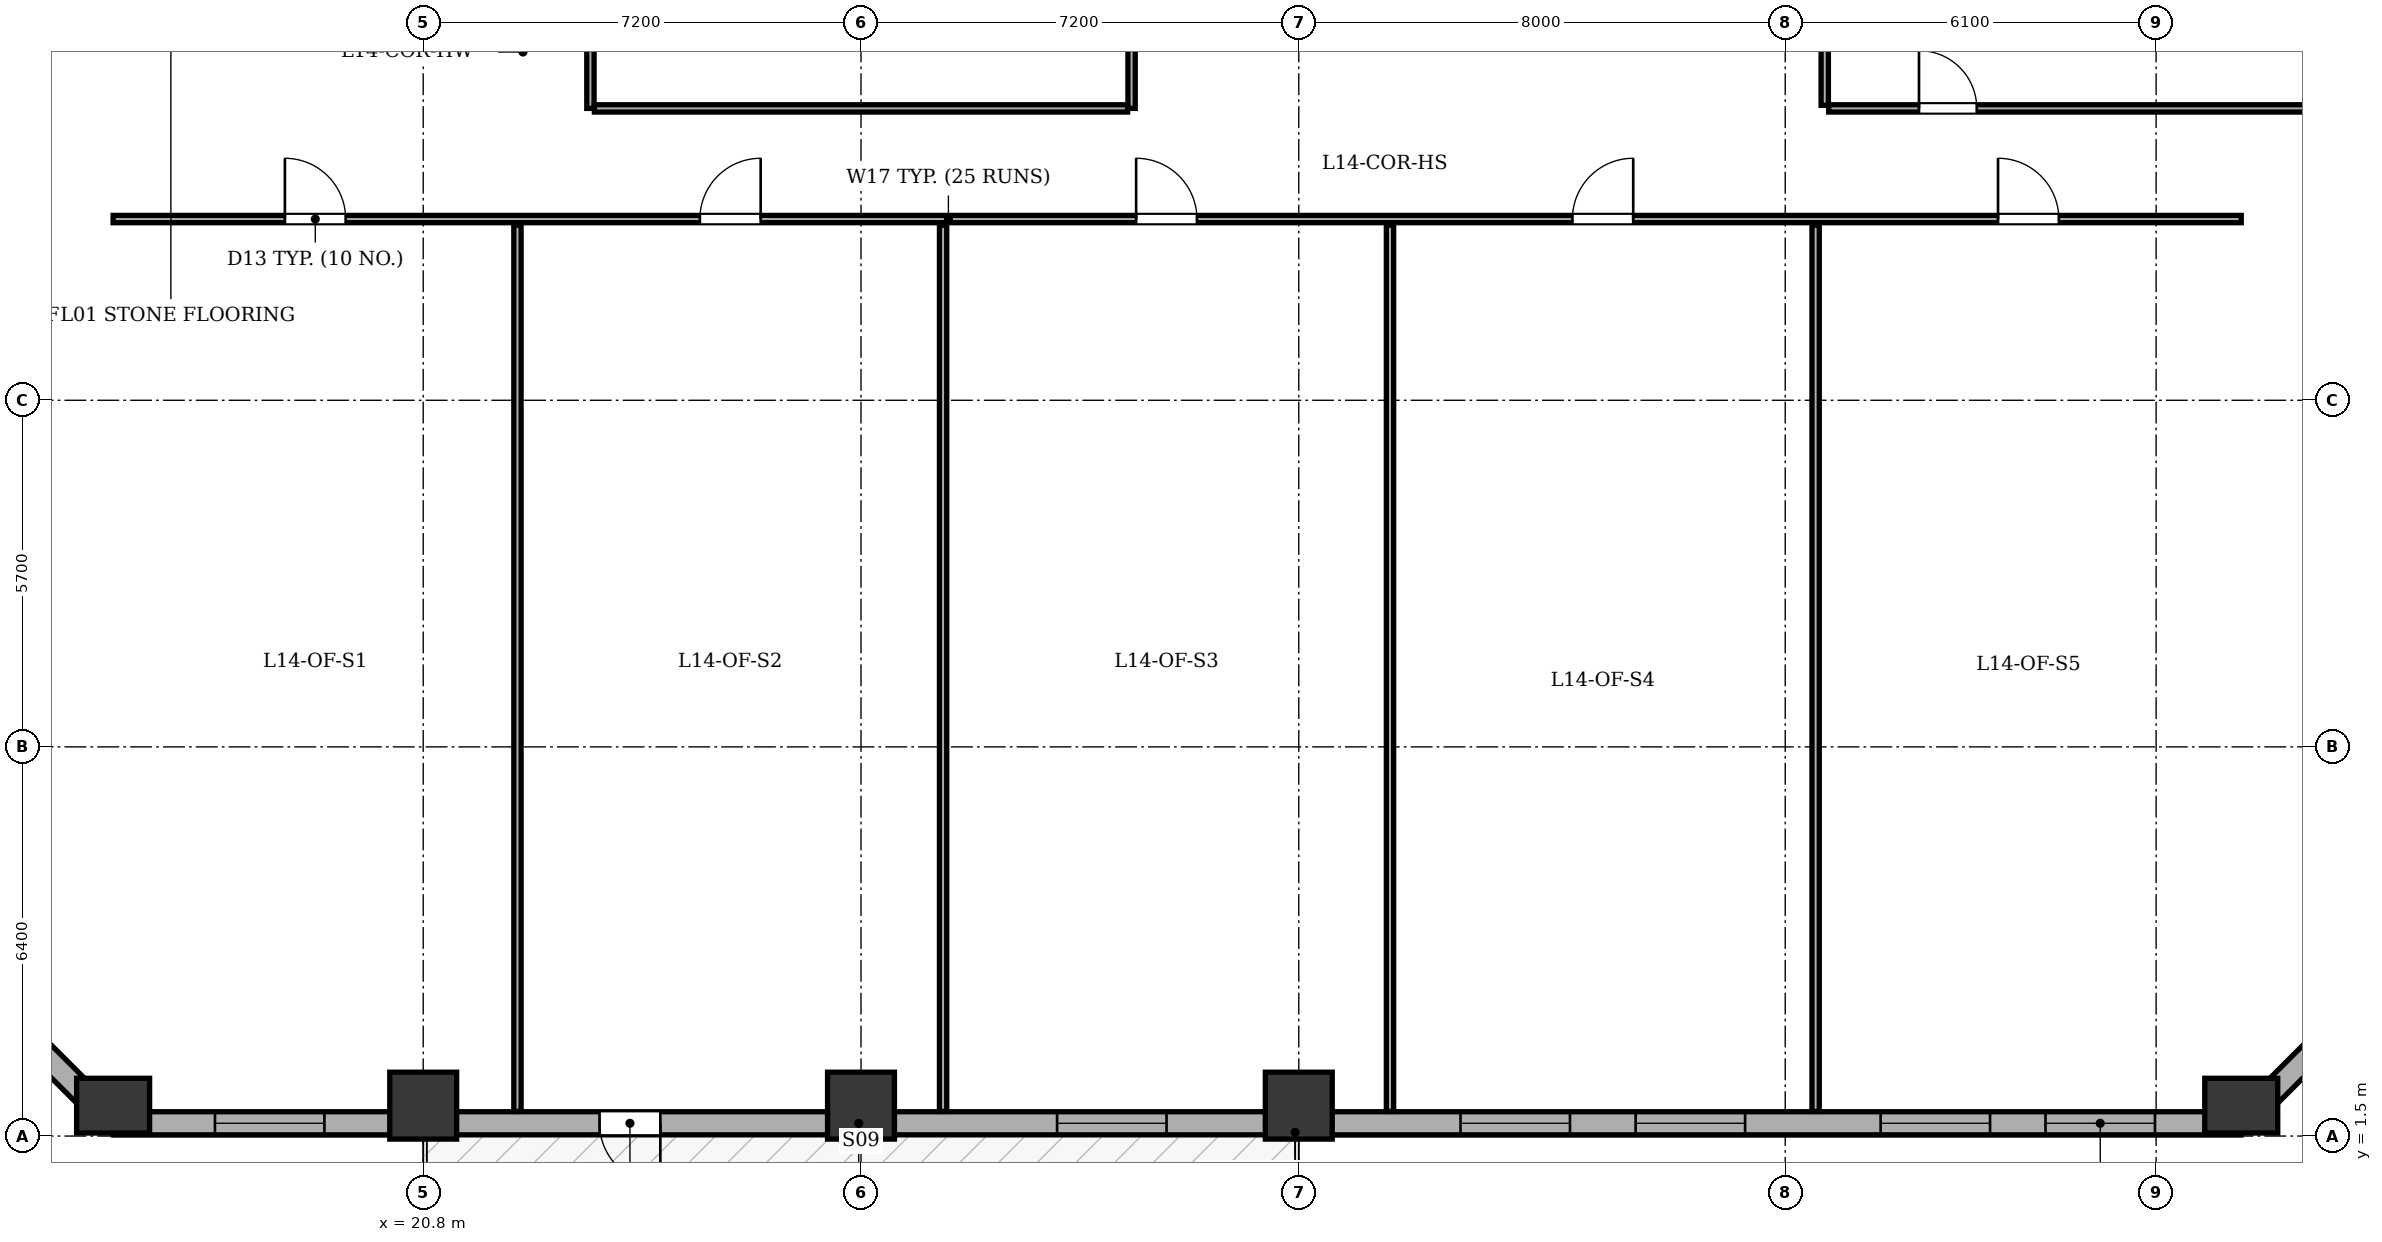
"""IFC4 building model, lengths in metres.
Left out: names, types, materials, properties, quantities, classifications, styles, units other than length and angle.
Written with IfcOpenShell. Run it as: python <this file> out.ifc"""

import sys

from ifc_helpers import new_model, si_unit, direction, frame, frame_2d, origin, origin_2d, place, context, subcontext, project, spatial, rectangle, extrude, element, fill, save


model = new_model("IFC4")
c1 = context("Model", 3, precision=1e-05, world=origin(), true_north=direction((0.0, 1.0)))
c2 = subcontext(c1, "Body", "Model", "MODEL_VIEW")
j1 = project(units=[si_unit("LENGTHUNIT", "METRE"), si_unit("PLANEANGLEUNIT", "RADIAN")], contexts=[c1])
p1 = place(None, origin())
s1 = spatial("IfcSite", under=j1, at=p1, CompositionType="ELEMENT")
p2 = place(p1, origin())
s2 = spatial("IfcBuilding", under=s1, at=p2, CompositionType="ELEMENT")
p3 = place(p2, frame((0.0, 0.0, 59.4)))
s3 = spatial("IfcBuildingStorey", under=s2, at=p3, CompositionType="ELEMENT", Elevation=59.4)
p4 = place(p3, frame((15.7, 2.0, 0.0), z_axis=(0.0, 0.0, 1.0), x_axis=(1.0, 0.0, 0.0)))
e1 = element("IfcColumn", 1, at=p4, inside=s3, PredefinedType="COLUMN", context=c2, shape_type="SweptSolid", body=[
    extrude(rectangle(XDim=0.9, YDim=1.2, at=origin_2d()), origin(), (0.0, 0.0, 1.0), 3.9),
])
for number, where, z_axis, x_axis in (
    (2, (20.8, 2.0, 0.0), (0.0, 0.0, 1.0), (1.0, 0.0, 0.0)),
    (3, (28.0, 2.0, 0.0), (0.0, 0.0, 1.0), (1.0, 0.0, 0.0)),
    (4, (35.2, 2.0, 0.0), (0.0, 0.0, 1.0), (1.0, 0.0, 0.0)),
):
    element("IfcColumn", number, at=place(p3, frame(where, z_axis=z_axis, x_axis=x_axis)), inside=s3, PredefinedType="COLUMN", context=c2, shape_type="SweptSolid", body=[
        extrude(rectangle(XDim=1.1, YDim=1.1, at=origin_2d()), origin(), (0.0, 0.0, 1.0), 3.9),
    ])
p5 = place(p3, frame((50.7, 2.0, 0.0), z_axis=(0.0, 0.0, 1.0), x_axis=(1.0, 0.0, 0.0)))
e5 = element("IfcColumn", 5, at=p5, inside=s3, PredefinedType="COLUMN", context=c2, shape_type="SweptSolid", body=[
    extrude(rectangle(XDim=0.9, YDim=1.2, at=origin_2d()), origin(), (0.0, 0.0, 1.0), 3.9),
])
p6 = place(p3, frame((50.7, 1.71, 0.0), z_axis=(0.0, 0.0, 1.0), x_axis=(-1.0, 0.0, 0.0)))
e6 = element("IfcWall", 6, at=p6, inside=s3, PredefinedType="STANDARD", context=c2, shape_type="SweptSolid", body=[
    extrude(rectangle(XDim=35.0, YDim=0.38, at=frame_2d((17.5, 0.0))), origin(), (0.0, 0.0, 1.0), 3.135),
])
p7 = place(p6, frame((26.0, 0.0, 0.0)))
e7 = element("IfcOpeningElement", 7, at=p7, cuts=e6, PredefinedType="OPENING", context=c2, shape_type="SweptSolid", body=[
    extrude(rectangle(XDim=1.0, YDim=2.02, at=frame_2d((0.5, 1.01))), frame((0.0, 0.2, 0.0), z_axis=(0.0, -1.0, 0.0), x_axis=(1.0, 0.0, 0.0)), (0.0, 0.0, 1.0), 0.4),
])
p8 = place(p6, frame((1.419, 0.0, 0.8)))
e8 = element("IfcOpeningElement", 8, at=p8, cuts=e6, PredefinedType="OPENING", context=c2, shape_type="SweptSolid", body=[
    extrude(rectangle(XDim=1.8, YDim=1.9, at=frame_2d((0.9, 0.95))), frame((0.0, 0.2, 0.0), z_axis=(0.0, -1.0, 0.0), x_axis=(1.0, 0.0, 0.0)), (0.0, 0.0, 1.0), 0.4),
])
p9 = place(p6, frame((4.131, 0.0, 0.8)))
e9 = element("IfcOpeningElement", 9, at=p9, cuts=e6, PredefinedType="OPENING", context=c2, shape_type="SweptSolid", body=[
    extrude(rectangle(XDim=1.8, YDim=1.9, at=frame_2d((0.9, 0.95))), frame((0.0, 0.2, 0.0), z_axis=(0.0, -1.0, 0.0), x_axis=(1.0, 0.0, 0.0)), (0.0, 0.0, 1.0), 0.4),
])
p10 = place(p6, frame((8.16, 0.0, 0.8)))
e10 = element("IfcOpeningElement", 10, at=p10, cuts=e6, PredefinedType="OPENING", context=c2, shape_type="SweptSolid", body=[
    extrude(rectangle(XDim=1.8, YDim=1.9, at=frame_2d((0.9, 0.95))), frame((0.0, 0.2, 0.0), z_axis=(0.0, -1.0, 0.0), x_axis=(1.0, 0.0, 0.0)), (0.0, 0.0, 1.0), 0.4),
])
p11 = place(p6, frame((11.04, 0.0, 0.8)))
e11 = element("IfcOpeningElement", 11, at=p11, cuts=e6, PredefinedType="OPENING", context=c2, shape_type="SweptSolid", body=[
    extrude(rectangle(XDim=1.8, YDim=1.9, at=frame_2d((0.9, 0.95))), frame((0.0, 0.2, 0.0), z_axis=(0.0, -1.0, 0.0), x_axis=(1.0, 0.0, 0.0)), (0.0, 0.0, 1.0), 0.4),
])
p12 = place(p6, frame((17.675, 0.0, 0.8)))
e12 = element("IfcOpeningElement", 12, at=p12, cuts=e6, PredefinedType="OPENING", context=c2, shape_type="SweptSolid", body=[
    extrude(rectangle(XDim=1.8, YDim=1.9, at=frame_2d((0.9, 0.95))), frame((0.0, 0.2, 0.0), z_axis=(0.0, -1.0, 0.0), x_axis=(1.0, 0.0, 0.0)), (0.0, 0.0, 1.0), 0.4),
])
p13 = place(p6, frame((31.525, 0.0, 0.8)))
e13 = element("IfcOpeningElement", 13, at=p13, cuts=e6, PredefinedType="OPENING", context=c2, shape_type="SweptSolid", body=[
    extrude(rectangle(XDim=1.8, YDim=1.9, at=frame_2d((0.9, 0.95))), frame((0.0, 0.2, 0.0), z_axis=(0.0, -1.0, 0.0), x_axis=(1.0, 0.0, 0.0)), (0.0, 0.0, 1.0), 0.4),
])
p14 = place(p3, frame((15.7, 1.71, 0.0), z_axis=(0.0, 0.0, 1.0), x_axis=(-0.707106781187, 0.707106781187, 0.0)))
e14 = element("IfcWall", 14, at=p14, inside=s3, PredefinedType="STANDARD", context=c2, shape_type="SweptSolid", body=[
    extrude(rectangle(XDim=6.774, YDim=0.38, at=frame_2d((3.387, 0.0))), origin(), (0.0, 0.0, 1.0), 3.135),
])
p15 = place(p14, frame((2.687, 0.0, 0.8)))
e15 = element("IfcOpeningElement", 15, at=p15, cuts=e14, PredefinedType="OPENING", context=c2, shape_type="SweptSolid", body=[
    extrude(rectangle(XDim=1.4, YDim=1.65, at=frame_2d((0.7, 0.825))), frame((0.0, 0.2, 0.0), z_axis=(0.0, -1.0, 0.0), x_axis=(1.0, 0.0, 0.0)), (0.0, 0.0, 1.0), 0.4),
])
p16 = place(p3, frame((55.49, 6.5, 0.0), z_axis=(0.0, 0.0, 1.0), x_axis=(-0.707106781187, -0.707106781187, 0.0)))
e16 = element("IfcWall", 16, at=p16, inside=s3, PredefinedType="STANDARD", context=c2, shape_type="SweptSolid", body=[
    extrude(rectangle(XDim=6.774, YDim=0.38, at=frame_2d((3.387, 0.0))), origin(), (0.0, 0.0, 1.0), 3.135),
])
p17 = place(p16, frame((2.687, 0.0, 0.8)))
e17 = element("IfcOpeningElement", 17, at=p17, cuts=e16, PredefinedType="OPENING", context=c2, shape_type="SweptSolid", body=[
    extrude(rectangle(XDim=1.4, YDim=1.65, at=frame_2d((0.7, 0.825))), frame((0.0, 0.2, 0.0), z_axis=(0.0, -1.0, 0.0), x_axis=(1.0, 0.0, 0.0)), (0.0, 0.0, 1.0), 0.4),
])
for number, where, z_axis, x_axis in (
    (18, (23.55, 18.4, 0.0), (0.0, 0.0, 1.0), (0.0, 1.0, 0.0)),
    (19, (32.45, 18.4, 0.0), (0.0, 0.0, 1.0), (0.0, 1.0, 0.0)),
):
    element("IfcWall", number, at=place(p3, frame(where, z_axis=z_axis, x_axis=x_axis)), inside=s3, PredefinedType="PARTITIONING", context=c2, shape_type="SweptSolid", body=[
        extrude(rectangle(XDim=3.485, YDim=0.12, at=frame_2d((1.743, 0.0))), origin(), (0.0, 0.0, 1.0), 3.6),
    ])
p18 = place(p3, frame((23.615, 18.4, 0.0), z_axis=(0.0, 0.0, 1.0), x_axis=(1.0, 0.0, 0.0)))
e20 = element("IfcWall", 20, at=p18, inside=s3, PredefinedType="PARTITIONING", context=c2, shape_type="SweptSolid", body=[
    extrude(rectangle(XDim=8.77, YDim=0.12, at=frame_2d((4.385, 0.0))), origin(), (0.0, 0.0, 1.0), 3.6),
])
p19 = place(p3, frame((15.7, 16.58, 0.0), z_axis=(0.0, 0.0, 1.0), x_axis=(1.0, 0.0, 0.0)))
e21 = element("IfcWall", 21, at=p19, inside=s3, PredefinedType="PARTITIONING", context=c2, shape_type="SweptSolid", body=[
    extrude(rectangle(XDim=35.0, YDim=0.12, at=frame_2d((17.5, 0.0))), origin(), (0.0, 0.0, 1.0), 3.6),
])
p20 = place(p19, frame((2.825, 0.0, 0.0)))
e22 = element("IfcOpeningElement", 22, at=p20, cuts=e21, PredefinedType="OPENING", context=c2, shape_type="SweptSolid", body=[
    extrude(rectangle(XDim=1.0, YDim=2.1, at=frame_2d((0.5, 1.05))), frame((0.0, 0.07, 0.0), z_axis=(0.0, -1.0, 0.0), x_axis=(1.0, 0.0, 0.0)), (0.0, 0.0, 1.0), 0.14),
])
p21 = place(p19, frame((9.65, 0.0, 0.0)))
e23 = element("IfcOpeningElement", 23, at=p21, cuts=e21, PredefinedType="OPENING", context=c2, shape_type="SweptSolid", body=[
    extrude(rectangle(XDim=1.0, YDim=2.1, at=frame_2d((0.5, 1.05))), frame((0.0, 0.07, 0.0), z_axis=(0.0, -1.0, 0.0), x_axis=(1.0, 0.0, 0.0)), (0.0, 0.0, 1.0), 0.14),
])
p22 = place(p19, frame((16.825, 0.0, 0.0)))
e24 = element("IfcOpeningElement", 24, at=p22, cuts=e21, PredefinedType="OPENING", context=c2, shape_type="SweptSolid", body=[
    extrude(rectangle(XDim=1.0, YDim=2.1, at=frame_2d((0.5, 1.05))), frame((0.0, 0.07, 0.0), z_axis=(0.0, -1.0, 0.0), x_axis=(1.0, 0.0, 0.0)), (0.0, 0.0, 1.0), 0.14),
])
p23 = place(p19, frame((24.0, 0.0, 0.0)))
e25 = element("IfcOpeningElement", 25, at=p23, cuts=e21, PredefinedType="OPENING", context=c2, shape_type="SweptSolid", body=[
    extrude(rectangle(XDim=1.0, YDim=2.1, at=frame_2d((0.5, 1.05))), frame((0.0, 0.07, 0.0), z_axis=(0.0, -1.0, 0.0), x_axis=(1.0, 0.0, 0.0)), (0.0, 0.0, 1.0), 0.14),
])
p24 = place(p19, frame((31.0, 0.0, 0.0)))
e26 = element("IfcOpeningElement", 26, at=p24, cuts=e21, PredefinedType="OPENING", context=c2, shape_type="SweptSolid", body=[
    extrude(rectangle(XDim=1.0, YDim=2.1, at=frame_2d((0.5, 1.05))), frame((0.0, 0.07, 0.0), z_axis=(0.0, -1.0, 0.0), x_axis=(1.0, 0.0, 0.0)), (0.0, 0.0, 1.0), 0.14),
])
p25 = place(p3, frame((22.35, 1.905, 0.0), z_axis=(0.0, 0.0, 1.0), x_axis=(0.0, 1.0, 0.0)))
e27 = element("IfcWall", 27, at=p25, inside=s3, PredefinedType="PARTITIONING", context=c2, shape_type="SweptSolid", body=[
    extrude(rectangle(XDim=14.575, YDim=0.12, at=frame_2d((7.288, 0.0))), origin(), (0.0, 0.0, 1.0), 3.135),
])
for number, where, z_axis, x_axis in (
    (28, (29.35, 1.905, 0.0), (0.0, 0.0, 1.0), (0.0, 1.0, 0.0)),
    (29, (36.7, 1.905, 0.0), (0.0, 0.0, 1.0), (0.0, 1.0, 0.0)),
    (30, (43.7, 1.905, 0.0), (0.0, 0.0, 1.0), (0.0, 1.0, 0.0)),
):
    element("IfcWall", number, at=place(p3, frame(where, z_axis=z_axis, x_axis=x_axis)), inside=s3, PredefinedType="PARTITIONING", context=c2, shape_type="SweptSolid", body=[
        extrude(rectangle(XDim=14.575, YDim=0.12, at=frame_2d((7.288, 0.0))), origin(), (0.0, 0.0, 1.0), 3.6),
    ])
p26 = place(p3, frame((43.85, 18.45, 0.0), z_axis=(0.0, 0.0, 1.0), x_axis=(0.0, 1.0, 0.0)))
e31 = element("IfcWall", 31, at=p26, inside=s3, PredefinedType="PARTITIONING", context=c2, shape_type="SweptSolid", body=[
    extrude(rectangle(XDim=17.5, YDim=0.12, at=frame_2d((8.75, 0.0))), origin(), (0.0, 0.0, 1.0), 3.6),
])
p27 = place(p3, frame((43.915, 18.4, 0.0), z_axis=(0.0, 0.0, 1.0), x_axis=(1.0, 0.0, 0.0)))
e32 = element("IfcWall", 32, at=p27, inside=s3, PredefinedType="PARTITIONING", context=c2, shape_type="SweptSolid", body=[
    extrude(rectangle(XDim=11.38, YDim=0.12, at=frame_2d((5.69, 0.0))), origin(), (0.0, 0.0, 1.0), 3.6),
])
p28 = place(p27, frame((1.485, 0.0, 0.0)))
e33 = element("IfcOpeningElement", 33, at=p28, cuts=e32, PredefinedType="OPENING", context=c2, shape_type="SweptSolid", body=[
    extrude(rectangle(XDim=0.95, YDim=2.1, at=frame_2d((0.475, 1.05))), frame((0.0, 0.07, 0.0), z_axis=(0.0, -1.0, 0.0), x_axis=(1.0, 0.0, 0.0)), (0.0, 0.0, 1.0), 0.14),
])
p29 = place(p7, origin())
e34 = element("IfcDoor", 34, at=p29, inside=s3, OperationType="SINGLE_SWING_LEFT", PredefinedType="DOOR", context=c2, shape_type="SweptSolid", body=[
    extrude(rectangle(XDim=1.0, YDim=2.02, at=frame_2d((0.5, 1.01))), frame((0.0, 0.025, 0.0), z_axis=(0.0, -1.0, 0.0), x_axis=(1.0, 0.0, 0.0)), (0.0, 0.0, 1.0), 0.05),
])
fill(e7, e34)
p30 = place(p8, origin())
e35 = element("IfcWindow", 35, at=p30, inside=s3, PartitioningType="SINGLE_PANEL", PredefinedType="WINDOW", context=c2, shape_type="SweptSolid", body=[
    extrude(rectangle(XDim=1.8, YDim=1.9, at=frame_2d((0.9, 0.95))), frame((0.0, -0.01, 0.0), z_axis=(0.0, -1.0, 0.0), x_axis=(1.0, 0.0, 0.0)), (0.0, 0.0, 1.0), 0.06),
])
fill(e8, e35)
p31 = place(p9, origin())
e36 = element("IfcWindow", 36, at=p31, inside=s3, PartitioningType="SINGLE_PANEL", PredefinedType="WINDOW", context=c2, shape_type="SweptSolid", body=[
    extrude(rectangle(XDim=1.8, YDim=1.9, at=frame_2d((0.9, 0.95))), frame((0.0, -0.01, 0.0), z_axis=(0.0, -1.0, 0.0), x_axis=(1.0, 0.0, 0.0)), (0.0, 0.0, 1.0), 0.06),
])
fill(e9, e36)
p32 = place(p10, origin())
e37 = element("IfcWindow", 37, at=p32, inside=s3, PartitioningType="SINGLE_PANEL", PredefinedType="WINDOW", context=c2, shape_type="SweptSolid", body=[
    extrude(rectangle(XDim=1.8, YDim=1.9, at=frame_2d((0.9, 0.95))), frame((0.0, -0.01, 0.0), z_axis=(0.0, -1.0, 0.0), x_axis=(1.0, 0.0, 0.0)), (0.0, 0.0, 1.0), 0.06),
])
fill(e10, e37)
p33 = place(p11, origin())
e38 = element("IfcWindow", 38, at=p33, inside=s3, PartitioningType="SINGLE_PANEL", PredefinedType="WINDOW", context=c2, shape_type="SweptSolid", body=[
    extrude(rectangle(XDim=1.8, YDim=1.9, at=frame_2d((0.9, 0.95))), frame((0.0, -0.01, 0.0), z_axis=(0.0, -1.0, 0.0), x_axis=(1.0, 0.0, 0.0)), (0.0, 0.0, 1.0), 0.06),
])
fill(e11, e38)
p34 = place(p12, origin())
e39 = element("IfcWindow", 39, at=p34, inside=s3, PartitioningType="SINGLE_PANEL", PredefinedType="WINDOW", context=c2, shape_type="SweptSolid", body=[
    extrude(rectangle(XDim=1.8, YDim=1.9, at=frame_2d((0.9, 0.95))), frame((0.0, -0.01, 0.0), z_axis=(0.0, -1.0, 0.0), x_axis=(1.0, 0.0, 0.0)), (0.0, 0.0, 1.0), 0.06),
])
fill(e12, e39)
p35 = place(p13, origin())
e40 = element("IfcWindow", 40, at=p35, inside=s3, PartitioningType="SINGLE_PANEL", PredefinedType="WINDOW", context=c2, shape_type="SweptSolid", body=[
    extrude(rectangle(XDim=1.8, YDim=1.9, at=frame_2d((0.9, 0.95))), frame((0.0, -0.01, 0.0), z_axis=(0.0, -1.0, 0.0), x_axis=(1.0, 0.0, 0.0)), (0.0, 0.0, 1.0), 0.06),
])
fill(e13, e40)
p36 = place(p20, origin())
e41 = element("IfcDoor", 41, at=p36, inside=s3, OperationType="SINGLE_SWING_LEFT", PredefinedType="DOOR", context=c2, shape_type="SweptSolid", body=[
    extrude(rectangle(XDim=1.0, YDim=2.1, at=frame_2d((0.5, 1.05))), frame((0.0, 0.025, 0.0), z_axis=(0.0, -1.0, 0.0), x_axis=(1.0, 0.0, 0.0)), (0.0, 0.0, 1.0), 0.05),
])
fill(e22, e41)
p37 = place(p21, origin())
e42 = element("IfcDoor", 42, at=p37, inside=s3, OperationType="SINGLE_SWING_RIGHT", PredefinedType="DOOR", context=c2, shape_type="SweptSolid", body=[
    extrude(rectangle(XDim=1.0, YDim=2.1, at=frame_2d((0.5, 1.05))), frame((0.0, 0.025, 0.0), z_axis=(0.0, -1.0, 0.0), x_axis=(1.0, 0.0, 0.0)), (0.0, 0.0, 1.0), 0.05),
])
fill(e23, e42)
p38 = place(p22, origin())
e43 = element("IfcDoor", 43, at=p38, inside=s3, OperationType="SINGLE_SWING_LEFT", PredefinedType="DOOR", context=c2, shape_type="SweptSolid", body=[
    extrude(rectangle(XDim=1.0, YDim=2.1, at=frame_2d((0.5, 1.05))), frame((0.0, 0.025, 0.0), z_axis=(0.0, -1.0, 0.0), x_axis=(1.0, 0.0, 0.0)), (0.0, 0.0, 1.0), 0.05),
])
fill(e24, e43)
p39 = place(p23, origin())
e44 = element("IfcDoor", 44, at=p39, inside=s3, OperationType="SINGLE_SWING_RIGHT", PredefinedType="DOOR", context=c2, shape_type="SweptSolid", body=[
    extrude(rectangle(XDim=1.0, YDim=2.1, at=frame_2d((0.5, 1.05))), frame((0.0, 0.025, 0.0), z_axis=(0.0, -1.0, 0.0), x_axis=(1.0, 0.0, 0.0)), (0.0, 0.0, 1.0), 0.05),
])
fill(e25, e44)
p40 = place(p24, origin())
e45 = element("IfcDoor", 45, at=p40, inside=s3, OperationType="SINGLE_SWING_LEFT", PredefinedType="DOOR", context=c2, shape_type="SweptSolid", body=[
    extrude(rectangle(XDim=1.0, YDim=2.1, at=frame_2d((0.5, 1.05))), frame((0.0, 0.025, 0.0), z_axis=(0.0, -1.0, 0.0), x_axis=(1.0, 0.0, 0.0)), (0.0, 0.0, 1.0), 0.05),
])
fill(e26, e45)
p41 = place(p28, origin())
e46 = element("IfcDoor", 46, at=p41, inside=s3, OperationType="SINGLE_SWING_LEFT", PredefinedType="DOOR", context=c2, shape_type="SweptSolid", body=[
    extrude(rectangle(XDim=0.95, YDim=2.1, at=frame_2d((0.475, 1.05))), frame((0.0, 0.025, 0.0), z_axis=(0.0, -1.0, 0.0), x_axis=(1.0, 0.0, 0.0)), (0.0, 0.0, 1.0), 0.05),
])
fill(e33, e46)
save(model, sys.argv[1])
